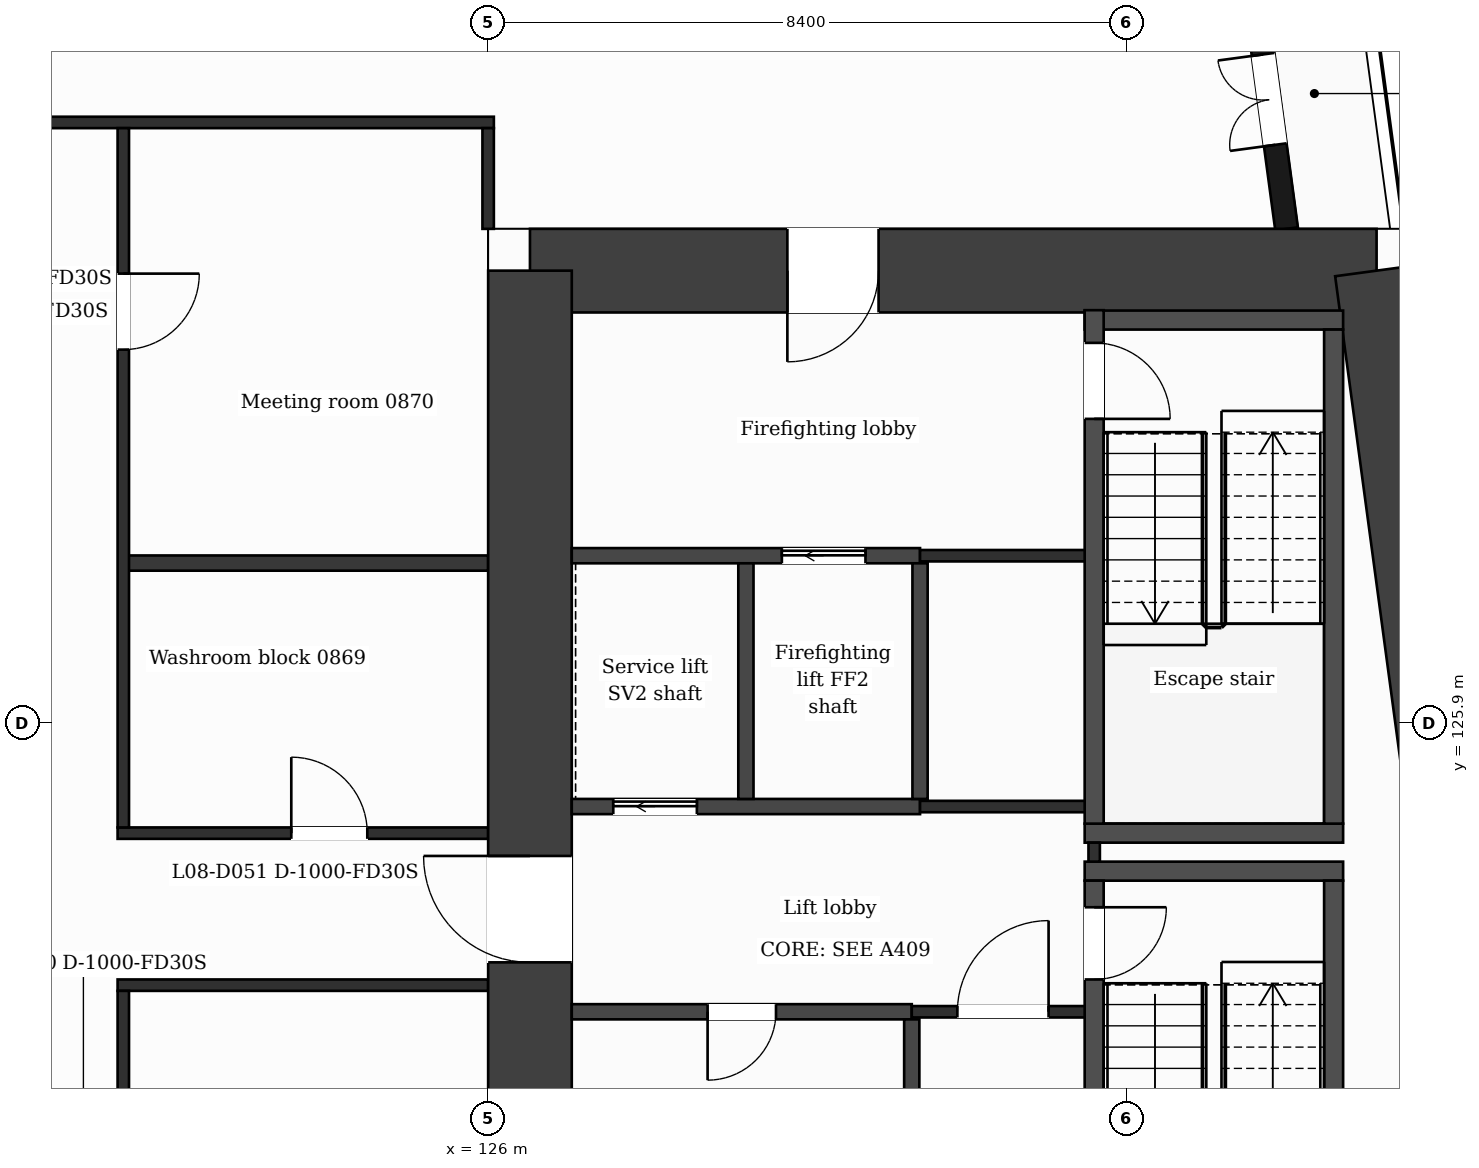
"""IFC4 building model, lengths in metres.
Left out: names, types, materials, properties, quantities, classifications, styles, units other than length and angle.
Written with IfcOpenShell. Run it as: python <this file> out.ifc"""

import sys

from ifc_helpers import new_model, si_unit, direction, frame, frame_2d, origin, place, context, subcontext, project, spatial, rectangle, extrude, element, fill, save


model = new_model("IFC4")
c1 = context("Model", 3, precision=1e-05, world=origin(), true_north=direction((0.0, 1.0)))
c2 = subcontext(c1, "Body", "Model", "MODEL_VIEW")
j1 = project(units=[si_unit("LENGTHUNIT", "METRE"), si_unit("PLANEANGLEUNIT", "RADIAN")], contexts=[c1])
p1 = place(None, origin())
s1 = spatial("IfcSite", under=j1, at=p1, CompositionType="ELEMENT")
p2 = place(p1, origin())
s2 = spatial("IfcBuilding", under=s1, at=p2, CompositionType="ELEMENT")
p3 = place(p2, frame((0.0, 0.0, 46.0)))
s3 = spatial("IfcBuildingStorey", under=s2, at=p3, CompositionType="ELEMENT", Elevation=46.0)
p4 = place(p3, frame((126.55, 131.85, 0.0), z_axis=(0.0, 0.0, 1.0), x_axis=(1.0, 0.0, 0.0)))
e1 = element("IfcWall", 1, at=p4, inside=s3, PredefinedType="SHEAR", context=c2, shape_type="SweptSolid", body=[
    extrude(rectangle(XDim=11.138, YDim=1.1, at=frame_2d((5.569, 0.0))), origin(), (0.0, 0.0, 1.0), 3.5),
])
p5 = place(p4, frame((3.386, 0.0, 0.0)))
e2 = element("IfcOpeningElement", 2, at=p5, cuts=e1, PredefinedType="OPENING", context=c2, shape_type="SweptSolid", body=[
    extrude(rectangle(XDim=1.2, YDim=2.1, at=frame_2d((0.6, 1.05))), frame((0.0, 0.56, 0.0), z_axis=(0.0, -1.0, 0.0), x_axis=(1.0, 0.0, 0.0)), (0.0, 0.0, 1.0), 1.12),
])
p6 = place(p3, frame((137.688, 131.85, 0.0), z_axis=(0.0, 0.0, 1.0), x_axis=(0.133411793472, -0.991060691059, 0.0)))
e3 = element("IfcWall", 3, at=p6, inside=s3, PredefinedType="SHEAR", context=c2, shape_type="SweptSolid", body=[
    extrude(rectangle(XDim=21.089, YDim=1.1, at=frame_2d((10.544, 0.0))), origin(), (0.0, 0.0, 1.0), 3.5),
])
p7 = place(p3, frame((126.55, 110.95, 0.0), z_axis=(0.0, 0.0, 1.0), x_axis=(0.0, 1.0, 0.0)))
e4 = element("IfcWall", 4, at=p7, inside=s3, PredefinedType="SHEAR", context=c2, shape_type="SweptSolid", body=[
    extrude(rectangle(XDim=20.9, YDim=1.1, at=frame_2d((10.45, 0.0))), origin(), (0.0, 0.0, 1.0), 3.5),
])
p8 = place(p7, frame((11.8, 0.0, 0.0)))
e5 = element("IfcOpeningElement", 5, at=p8, cuts=e4, PredefinedType="OPENING", context=c2, shape_type="SweptSolid", body=[
    extrude(rectangle(XDim=1.4, YDim=2.1, at=frame_2d((0.7, 1.05))), frame((0.0, 0.56, 0.0), z_axis=(0.0, -1.0, 0.0), x_axis=(1.0, 0.0, 0.0)), (0.0, 0.0, 1.0), 1.12),
])
p9 = place(p3, frame((136.504, 132.4, 0.0), z_axis=(0.0, 0.0, 1.0), x_axis=(-0.133399697462, 0.99106231929, 0.0)))
e6 = element("IfcWall", 6, at=p9, inside=s3, PredefinedType="SOLIDWALL", context=c2, shape_type="SweptSolid", body=[
    extrude(rectangle(XDim=6.74, YDim=0.3, at=frame_2d((3.37, 0.0))), origin(), (0.0, 0.0, 1.0), 3.18),
])
p10 = place(p9, frame((1.115, 0.0, 0.0)))
e7 = element("IfcOpeningElement", 7, at=p10, cuts=e6, PredefinedType="OPENING", context=c2, shape_type="SweptSolid", body=[
    extrude(rectangle(XDim=1.2, YDim=2.4, at=frame_2d((0.6, 1.2))), frame((0.0, 0.16, 0.0), z_axis=(0.0, -1.0, 0.0), x_axis=(1.0, 0.0, 0.0)), (0.0, 0.0, 1.0), 0.32),
])
p11 = place(p9, frame((3.835, 0.0, 0.9)))
e8 = element("IfcOpeningElement", 8, at=p11, cuts=e6, PredefinedType="OPENING", context=c2, shape_type="SweptSolid", body=[
    extrude(rectangle(XDim=2.4, YDim=2.1, at=frame_2d((1.2, 1.05))), frame((0.0, 0.16, 0.0), z_axis=(0.0, -1.0, 0.0), x_axis=(1.0, 0.0, 0.0)), (0.0, 0.0, 1.0), 0.32),
])
p12 = place(p3, frame((127.1, 122.1, 0.0), z_axis=(0.0, 0.0, 1.0), x_axis=(1.0, 0.0, 0.0)))
e9 = element("IfcWall", 9, at=p12, inside=s3, PredefinedType="PARTITIONING", context=c2, shape_type="SweptSolid", body=[
    extrude(rectangle(XDim=4.473, YDim=0.2, at=frame_2d((2.236, 0.0))), origin(), (0.0, 0.0, 1.0), 3.18),
])
p13 = place(p12, frame((1.787, 0.0, 0.0)))
e10 = element("IfcOpeningElement", 10, at=p13, cuts=e9, PredefinedType="OPENING", context=c2, shape_type="SweptSolid", body=[
    extrude(rectangle(XDim=0.9, YDim=2.1, at=frame_2d((0.45, 1.05))), frame((0.0, 0.11, 0.0), z_axis=(0.0, -1.0, 0.0), x_axis=(1.0, 0.0, 0.0)), (0.0, 0.0, 1.0), 0.22),
])
p14 = place(p3, frame((131.573, 122.1, 0.0), z_axis=(0.0, 0.0, 1.0), x_axis=(1.0, 0.0, 0.0)))
e11 = element("IfcWall", 11, at=p14, inside=s3, PredefinedType="PARTITIONING", context=c2, shape_type="SweptSolid", body=[
    extrude(rectangle(XDim=2.4, YDim=0.15, at=frame_2d((1.2, 0.0))), origin(), (0.0, 0.0, 1.0), 3.18),
])
p15 = place(p14, frame((0.6, 0.0, 0.0)))
e12 = element("IfcOpeningElement", 12, at=p15, cuts=e11, PredefinedType="OPENING", context=c2, shape_type="SweptSolid", body=[
    extrude(rectangle(XDim=1.2, YDim=2.1, at=frame_2d((0.6, 1.05))), frame((0.0, 0.085, 0.0), z_axis=(0.0, -1.0, 0.0), x_axis=(1.0, 0.0, 0.0)), (0.0, 0.0, 1.0), 0.17),
])
p16 = place(p3, frame((121.125, 122.45, 0.0), z_axis=(0.0, 0.0, 1.0), x_axis=(1.0, 0.0, 0.0)))
e13 = element("IfcWall", 13, at=p16, inside=s3, PredefinedType="PARTITIONING", context=c2, shape_type="SweptSolid", body=[
    extrude(rectangle(XDim=4.875, YDim=0.15, at=frame_2d((2.438, 0.0))), origin(), (0.0, 0.0, 1.0), 3.18),
])
for number, where, z_axis, x_axis in (
    (14, (133.848, 123.95, 0.0), (0.0, 0.0, 1.0), (1.0, 0.0, 0.0)),
    (15, (133.848, 124.45, 0.0), (0.0, 0.0, 1.0), (1.0, 0.0, 0.0)),
):
    element("IfcWall", number, at=place(p3, frame(where, z_axis=z_axis, x_axis=x_axis)), inside=s3, PredefinedType="PARTITIONING", context=c2, shape_type="SweptSolid", body=[
        extrude(rectangle(XDim=3.4, YDim=0.25, at=frame_2d((1.7, 0.0))), origin(), (0.0, 0.0, 1.0), 3.18),
    ])
p17 = place(p3, frame((121.125, 124.45, 0.0), z_axis=(0.0, 0.0, 1.0), x_axis=(1.0, 0.0, 0.0)))
e16 = element("IfcWall", 16, at=p17, inside=s3, PredefinedType="PARTITIONING", context=c2, shape_type="SweptSolid", body=[
    extrude(rectangle(XDim=4.875, YDim=0.15, at=frame_2d((2.438, 0.0))), origin(), (0.0, 0.0, 1.0), 3.18),
])
p18 = place(p17, frame((2.285, 0.0, 0.0)))
e17 = element("IfcOpeningElement", 17, at=p18, cuts=e16, PredefinedType="OPENING", context=c2, shape_type="SweptSolid", body=[
    extrude(rectangle(XDim=1.0, YDim=2.1, at=frame_2d((0.5, 1.05))), frame((0.0, 0.085, 0.0), z_axis=(0.0, -1.0, 0.0), x_axis=(1.0, 0.0, 0.0)), (0.0, 0.0, 1.0), 0.17),
])
p19 = place(p3, frame((127.1, 124.8, 0.0), z_axis=(0.0, 0.0, 1.0), x_axis=(1.0, 0.0, 0.0)))
e18 = element("IfcWall", 18, at=p19, inside=s3, PredefinedType="PARTITIONING", context=c2, shape_type="SweptSolid", body=[
    extrude(rectangle(XDim=4.582, YDim=0.2, at=frame_2d((2.291, 0.0))), origin(), (0.0, 0.0, 1.0), 3.18),
])
p20 = place(p19, frame((0.546, 0.0, 0.0)))
e19 = element("IfcOpeningElement", 19, at=p20, cuts=e18, PredefinedType="OPENING", context=c2, shape_type="SweptSolid", body=[
    extrude(rectangle(XDim=1.1, YDim=2.1, at=frame_2d((0.55, 1.05))), frame((0.0, 0.11, 0.0), z_axis=(0.0, -1.0, 0.0), x_axis=(1.0, 0.0, 0.0)), (0.0, 0.0, 1.0), 0.22),
])
p21 = place(p3, frame((131.682, 124.8, 0.0), z_axis=(0.0, 0.0, 1.0), x_axis=(1.0, 0.0, 0.0)))
e20 = element("IfcWall", 20, at=p21, inside=s3, PredefinedType="PARTITIONING", context=c2, shape_type="SweptSolid", body=[
    extrude(rectangle(XDim=2.416, YDim=0.15, at=frame_2d((1.208, 0.0))), origin(), (0.0, 0.0, 1.0), 3.18),
])
p22 = place(p3, frame((121.2, 128.003, 0.0), z_axis=(0.0, 0.0, 1.0), x_axis=(1.0, 0.0, 0.0)))
e21 = element("IfcWall", 21, at=p22, inside=s3, PredefinedType="PARTITIONING", context=c2, shape_type="SweptSolid", body=[
    extrude(rectangle(XDim=4.8, YDim=0.2, at=frame_2d((2.4, 0.0))), origin(), (0.0, 0.0, 1.0), 3.18),
])
p23 = place(p3, frame((127.1, 128.1, 0.0), z_axis=(0.0, 0.0, 1.0), x_axis=(1.0, 0.0, 0.0)))
e22 = element("IfcWall", 22, at=p23, inside=s3, PredefinedType="PARTITIONING", context=c2, shape_type="SweptSolid", body=[
    extrude(rectangle(XDim=4.582, YDim=0.2, at=frame_2d((2.291, 0.0))), origin(), (0.0, 0.0, 1.0), 3.18),
])
p24 = place(p23, frame((2.764, 0.0, 0.0)))
e23 = element("IfcOpeningElement", 23, at=p24, cuts=e22, PredefinedType="OPENING", context=c2, shape_type="SweptSolid", body=[
    extrude(rectangle(XDim=1.1, YDim=2.1, at=frame_2d((0.55, 1.05))), frame((0.0, 0.11, 0.0), z_axis=(0.0, -1.0, 0.0), x_axis=(1.0, 0.0, 0.0)), (0.0, 0.0, 1.0), 0.22),
])
p25 = place(p3, frame((131.682, 128.1, 0.0), z_axis=(0.0, 0.0, 1.0), x_axis=(1.0, 0.0, 0.0)))
e24 = element("IfcWall", 24, at=p25, inside=s3, PredefinedType="PARTITIONING", context=c2, shape_type="SweptSolid", body=[
    extrude(rectangle(XDim=2.291, YDim=0.15, at=frame_2d((1.146, 0.0))), origin(), (0.0, 0.0, 1.0), 3.18),
])
p26 = place(p3, frame((133.848, 131.2, 0.0), z_axis=(0.0, 0.0, 1.0), x_axis=(1.0, 0.0, 0.0)))
e25 = element("IfcWall", 25, at=p26, inside=s3, PredefinedType="PARTITIONING", context=c2, shape_type="SweptSolid", body=[
    extrude(rectangle(XDim=3.4, YDim=0.25, at=frame_2d((1.7, 0.0))), origin(), (0.0, 0.0, 1.0), 3.18),
])
p27 = place(p3, frame((100.725, 133.8, 0.0), z_axis=(0.0, 0.0, 1.0), x_axis=(1.0, 0.0, 0.0)))
e26 = element("IfcWall", 26, at=p27, inside=s3, PredefinedType="PARTITIONING", context=c2, shape_type="SweptSolid", body=[
    extrude(rectangle(XDim=25.35, YDim=0.15, at=frame_2d((12.675, 0.0))), origin(), (0.0, 0.0, 1.0), 3.18),
])
p28 = place(p3, frame((121.2, 109.075, 0.0), z_axis=(0.0, 0.0, 1.0), x_axis=(0.0, 1.0, 0.0)))
e27 = element("IfcWall", 27, at=p28, inside=s3, PredefinedType="PARTITIONING", context=c2, shape_type="SweptSolid", body=[
    extrude(rectangle(XDim=13.3, YDim=0.15, at=frame_2d((6.65, 0.0))), origin(), (0.0, 0.0, 1.0), 3.18),
])
p29 = place(p28, frame((9.154, 0.0, 0.0)))
e28 = element("IfcOpeningElement", 28, at=p29, cuts=e27, PredefinedType="OPENING", context=c2, shape_type="SweptSolid", body=[
    extrude(rectangle(XDim=1.0, YDim=2.1, at=frame_2d((0.5, 1.05))), frame((0.0, 0.085, 0.0), z_axis=(0.0, -1.0, 0.0), x_axis=(1.0, 0.0, 0.0)), (0.0, 0.0, 1.0), 0.17),
])
p30 = place(p3, frame((121.2, 124.525, 0.0), z_axis=(0.0, 0.0, 1.0), x_axis=(0.0, 1.0, 0.0)))
e29 = element("IfcWall", 29, at=p30, inside=s3, PredefinedType="PARTITIONING", context=c2, shape_type="SweptSolid", body=[
    extrude(rectangle(XDim=9.2, YDim=0.15, at=frame_2d((4.6, 0.0))), origin(), (0.0, 0.0, 1.0), 3.18),
])
p31 = place(p30, frame((6.286, 0.0, 0.0)))
e30 = element("IfcOpeningElement", 30, at=p31, cuts=e29, PredefinedType="OPENING", context=c2, shape_type="SweptSolid", body=[
    extrude(rectangle(XDim=1.0, YDim=2.1, at=frame_2d((0.5, 1.05))), frame((0.0, 0.085, 0.0), z_axis=(0.0, -1.0, 0.0), x_axis=(1.0, 0.0, 0.0)), (0.0, 0.0, 1.0), 0.17),
])
p32 = place(p3, frame((126.0, 132.4, 0.0), z_axis=(0.0, 0.0, 1.0), x_axis=(0.0, 1.0, 0.0)))
e31 = element("IfcWall", 31, at=p32, inside=s3, PredefinedType="PARTITIONING", context=c2, shape_type="SweptSolid", body=[
    extrude(rectangle(XDim=1.325, YDim=0.15, at=frame_2d((0.663, 0.0))), origin(), (0.0, 0.0, 1.0), 3.18),
])
p33 = place(p3, frame((129.391, 124.9, 0.0), z_axis=(0.0, 0.0, 1.0), x_axis=(0.0, 1.0, 0.0)))
e32 = element("IfcWall", 32, at=p33, inside=s3, PredefinedType="PARTITIONING", context=c2, shape_type="SweptSolid", body=[
    extrude(rectangle(XDim=3.1, YDim=0.2, at=frame_2d((1.55, 0.0))), origin(), (0.0, 0.0, 1.0), 3.18),
])
p34 = place(p3, frame((131.573, 117.07, 0.0), z_axis=(0.0, 0.0, 1.0), x_axis=(0.0, 1.0, 0.0)))
e33 = element("IfcWall", 33, at=p34, inside=s3, PredefinedType="PARTITIONING", context=c2, shape_type="SweptSolid", body=[
    extrude(rectangle(XDim=4.93, YDim=0.2, at=frame_2d((2.465, 0.0))), origin(), (0.0, 0.0, 1.0), 3.18),
])
p35 = place(p34, frame((0.48, 0.0, 0.0)))
e34 = element("IfcOpeningElement", 34, at=p35, cuts=e33, PredefinedType="OPENING", context=c2, shape_type="SweptSolid", body=[
    extrude(rectangle(XDim=0.9, YDim=2.1, at=frame_2d((0.45, 1.05))), frame((0.0, 0.11, 0.0), z_axis=(0.0, -1.0, 0.0), x_axis=(1.0, 0.0, 0.0)), (0.0, 0.0, 1.0), 0.22),
])
p36 = place(p3, frame((131.682, 124.9, 0.0), z_axis=(0.0, 0.0, 1.0), x_axis=(0.0, 1.0, 0.0)))
e35 = element("IfcWall", 35, at=p36, inside=s3, PredefinedType="PARTITIONING", context=c2, shape_type="SweptSolid", body=[
    extrude(rectangle(XDim=3.1, YDim=0.2, at=frame_2d((1.55, 0.0))), origin(), (0.0, 0.0, 1.0), 3.18),
])
p37 = place(p3, frame((133.973, 124.075, 0.0), z_axis=(0.0, 0.0, 1.0), x_axis=(0.0, 1.0, 0.0)))
e36 = element("IfcWall", 36, at=p37, inside=s3, PredefinedType="PARTITIONING", context=c2, shape_type="SweptSolid", body=[
    extrude(rectangle(XDim=0.25, YDim=0.15, at=frame_2d((0.125, 0.0))), origin(), (0.0, 0.0, 1.0), 3.18),
])
p38 = place(p3, frame((133.973, 117.07, 0.0), z_axis=(0.0, 0.0, 1.0), x_axis=(0.0, 1.0, 0.0)))
e37 = element("IfcWall", 37, at=p38, inside=s3, PredefinedType="PARTITIONING", context=c2, shape_type="SweptSolid", body=[
    extrude(rectangle(XDim=6.755, YDim=0.25, at=frame_2d((3.377, 0.0))), origin(), (0.0, 0.0, 1.0), 3.18),
])
p39 = place(p38, frame((5.455, 0.0, 0.0)))
e38 = element("IfcOpeningElement", 38, at=p39, cuts=e37, PredefinedType="OPENING", context=c2, shape_type="SweptSolid", body=[
    extrude(rectangle(XDim=0.95, YDim=2.1, at=frame_2d((0.475, 1.05))), frame((0.0, 0.135, 0.0), z_axis=(0.0, -1.0, 0.0), x_axis=(1.0, 0.0, 0.0)), (0.0, 0.0, 1.0), 0.27),
])
p40 = place(p3, frame((133.973, 124.575, 0.0), z_axis=(0.0, 0.0, 1.0), x_axis=(0.0, 1.0, 0.0)))
e39 = element("IfcWall", 39, at=p40, inside=s3, PredefinedType="PARTITIONING", context=c2, shape_type="SweptSolid", body=[
    extrude(rectangle(XDim=6.755, YDim=0.25, at=frame_2d((3.377, 0.0))), origin(), (0.0, 0.0, 1.0), 3.18),
])
p41 = place(p40, frame((5.325, 0.0, 0.0)))
e40 = element("IfcOpeningElement", 40, at=p41, cuts=e39, PredefinedType="OPENING", context=c2, shape_type="SweptSolid", body=[
    extrude(rectangle(XDim=1.0, YDim=2.1, at=frame_2d((0.5, 1.05))), frame((0.0, 0.135, 0.0), z_axis=(0.0, -1.0, 0.0), x_axis=(1.0, 0.0, 0.0)), (0.0, 0.0, 1.0), 0.27),
])
p42 = place(p3, frame((137.123, 117.07, 0.0), z_axis=(0.0, 0.0, 1.0), x_axis=(0.0, 1.0, 0.0)))
e41 = element("IfcWall", 41, at=p42, inside=s3, PredefinedType="PARTITIONING", context=c2, shape_type="SweptSolid", body=[
    extrude(rectangle(XDim=6.755, YDim=0.25, at=frame_2d((3.377, 0.0))), origin(), (0.0, 0.0, 1.0), 3.18),
])
p43 = place(p3, frame((137.123, 124.575, 0.0), z_axis=(0.0, 0.0, 1.0), x_axis=(0.0, 1.0, 0.0)))
e42 = element("IfcWall", 42, at=p43, inside=s3, PredefinedType="PARTITIONING", context=c2, shape_type="SweptSolid", body=[
    extrude(rectangle(XDim=6.5, YDim=0.25, at=frame_2d((3.25, 0.0))), origin(), (0.0, 0.0, 1.0), 3.18),
])
p44 = place(p10, origin())
e43 = element("IfcDoor", 43, at=p44, inside=s3, OperationType="DOUBLE_DOOR_SINGLE_SWING", PredefinedType="DOOR", context=c2, shape_type="SweptSolid", body=[
    extrude(rectangle(XDim=1.2, YDim=2.4, at=frame_2d((0.6, 1.2))), frame((0.0, 0.025, 0.0), z_axis=(0.0, -1.0, 0.0), x_axis=(1.0, 0.0, 0.0)), (0.0, 0.0, 1.0), 0.05),
])
fill(e7, e43)
p45 = place(p15, origin())
e44 = element("IfcDoor", 44, at=p45, inside=s3, OperationType="SINGLE_SWING_RIGHT", PredefinedType="DOOR", context=c2, shape_type="SweptSolid", body=[
    extrude(rectangle(XDim=1.2, YDim=2.1, at=frame_2d((0.6, 1.05))), frame((0.0, 0.025, 0.0), z_axis=(0.0, -1.0, 0.0), x_axis=(1.0, 0.0, 0.0)), (0.0, 0.0, 1.0), 0.05),
])
fill(e12, e44)
p46 = place(p24, origin())
e45 = element("IfcDoor", 45, at=p46, inside=s3, OperationType="SLIDING_TO_LEFT", PredefinedType="DOOR", context=c2, shape_type="SweptSolid", body=[
    extrude(rectangle(XDim=1.1, YDim=2.1, at=frame_2d((0.55, 1.05))), frame((0.0, 0.025, 0.0), z_axis=(0.0, -1.0, 0.0), x_axis=(1.0, 0.0, 0.0)), (0.0, 0.0, 1.0), 0.05),
])
fill(e23, e45)
p47 = place(p20, origin())
e46 = element("IfcDoor", 46, at=p47, inside=s3, OperationType="SLIDING_TO_LEFT", PredefinedType="DOOR", context=c2, shape_type="SweptSolid", body=[
    extrude(rectangle(XDim=1.1, YDim=2.1, at=frame_2d((0.55, 1.05))), frame((0.0, 0.025, 0.0), z_axis=(0.0, -1.0, 0.0), x_axis=(1.0, 0.0, 0.0)), (0.0, 0.0, 1.0), 0.05),
])
fill(e19, e46)
p48 = place(p13, origin())
e47 = element("IfcDoor", 47, at=p48, inside=s3, OperationType="SINGLE_SWING_LEFT", PredefinedType="DOOR", context=c2, shape_type="SweptSolid", body=[
    extrude(rectangle(XDim=0.9, YDim=2.1, at=frame_2d((0.45, 1.05))), frame((0.0, 0.025, 0.0), z_axis=(0.0, -1.0, 0.0), x_axis=(1.0, 0.0, 0.0)), (0.0, 0.0, 1.0), 0.05),
])
fill(e10, e47)
p49 = place(p39, origin())
e48 = element("IfcDoor", 48, at=p49, inside=s3, OperationType="SINGLE_SWING_RIGHT", PredefinedType="DOOR", context=c2, shape_type="SweptSolid", body=[
    extrude(rectangle(XDim=0.95, YDim=2.1, at=frame_2d((0.475, 1.05))), frame((0.0, 0.025, 0.0), z_axis=(0.0, -1.0, 0.0), x_axis=(1.0, 0.0, 0.0)), (0.0, 0.0, 1.0), 0.05),
])
fill(e38, e48)
p50 = place(p41, origin())
e49 = element("IfcDoor", 49, at=p50, inside=s3, OperationType="SINGLE_SWING_LEFT", PredefinedType="DOOR", context=c2, shape_type="SweptSolid", body=[
    extrude(rectangle(XDim=1.0, YDim=2.1, at=frame_2d((0.5, 1.05))), frame((0.0, 0.025, 0.0), z_axis=(0.0, -1.0, 0.0), x_axis=(1.0, 0.0, 0.0)), (0.0, 0.0, 1.0), 0.05),
])
fill(e40, e49)
p51 = place(p18, origin())
e50 = element("IfcDoor", 50, at=p51, inside=s3, OperationType="SINGLE_SWING_LEFT", PredefinedType="DOOR", context=c2, shape_type="SweptSolid", body=[
    extrude(rectangle(XDim=1.0, YDim=2.1, at=frame_2d((0.5, 1.05))), frame((0.0, 0.025, 0.0), z_axis=(0.0, -1.0, 0.0), x_axis=(1.0, 0.0, 0.0)), (0.0, 0.0, 1.0), 0.05),
])
fill(e17, e50)
p52 = place(p31, origin())
e51 = element("IfcDoor", 51, at=p52, inside=s3, OperationType="SINGLE_SWING_RIGHT", PredefinedType="DOOR", context=c2, shape_type="SweptSolid", body=[
    extrude(rectangle(XDim=1.0, YDim=2.1, at=frame_2d((0.5, 1.05))), frame((0.0, 0.025, 0.0), z_axis=(0.0, -1.0, 0.0), x_axis=(1.0, 0.0, 0.0)), (0.0, 0.0, 1.0), 0.05),
])
fill(e30, e51)
p53 = place(p5, origin())
e52 = element("IfcDoor", 52, at=p53, inside=s3, OperationType="SINGLE_SWING_LEFT", PredefinedType="DOOR", context=c2, shape_type="SweptSolid", body=[
    extrude(rectangle(XDim=1.2, YDim=2.1, at=frame_2d((0.6, 1.05))), frame((0.0, 0.025, 0.0), z_axis=(0.0, -1.0, 0.0), x_axis=(1.0, 0.0, 0.0)), (0.0, 0.0, 1.0), 0.05),
])
fill(e2, e52)
p54 = place(p8, origin())
e53 = element("IfcDoor", 53, at=p54, inside=s3, OperationType="SINGLE_SWING_RIGHT", PredefinedType="DOOR", context=c2, shape_type="SweptSolid", body=[
    extrude(rectangle(XDim=1.4, YDim=2.1, at=frame_2d((0.7, 1.05))), frame((0.0, 0.025, 0.0), z_axis=(0.0, -1.0, 0.0), x_axis=(1.0, 0.0, 0.0)), (0.0, 0.0, 1.0), 0.05),
])
fill(e5, e53)
save(model, sys.argv[1])
